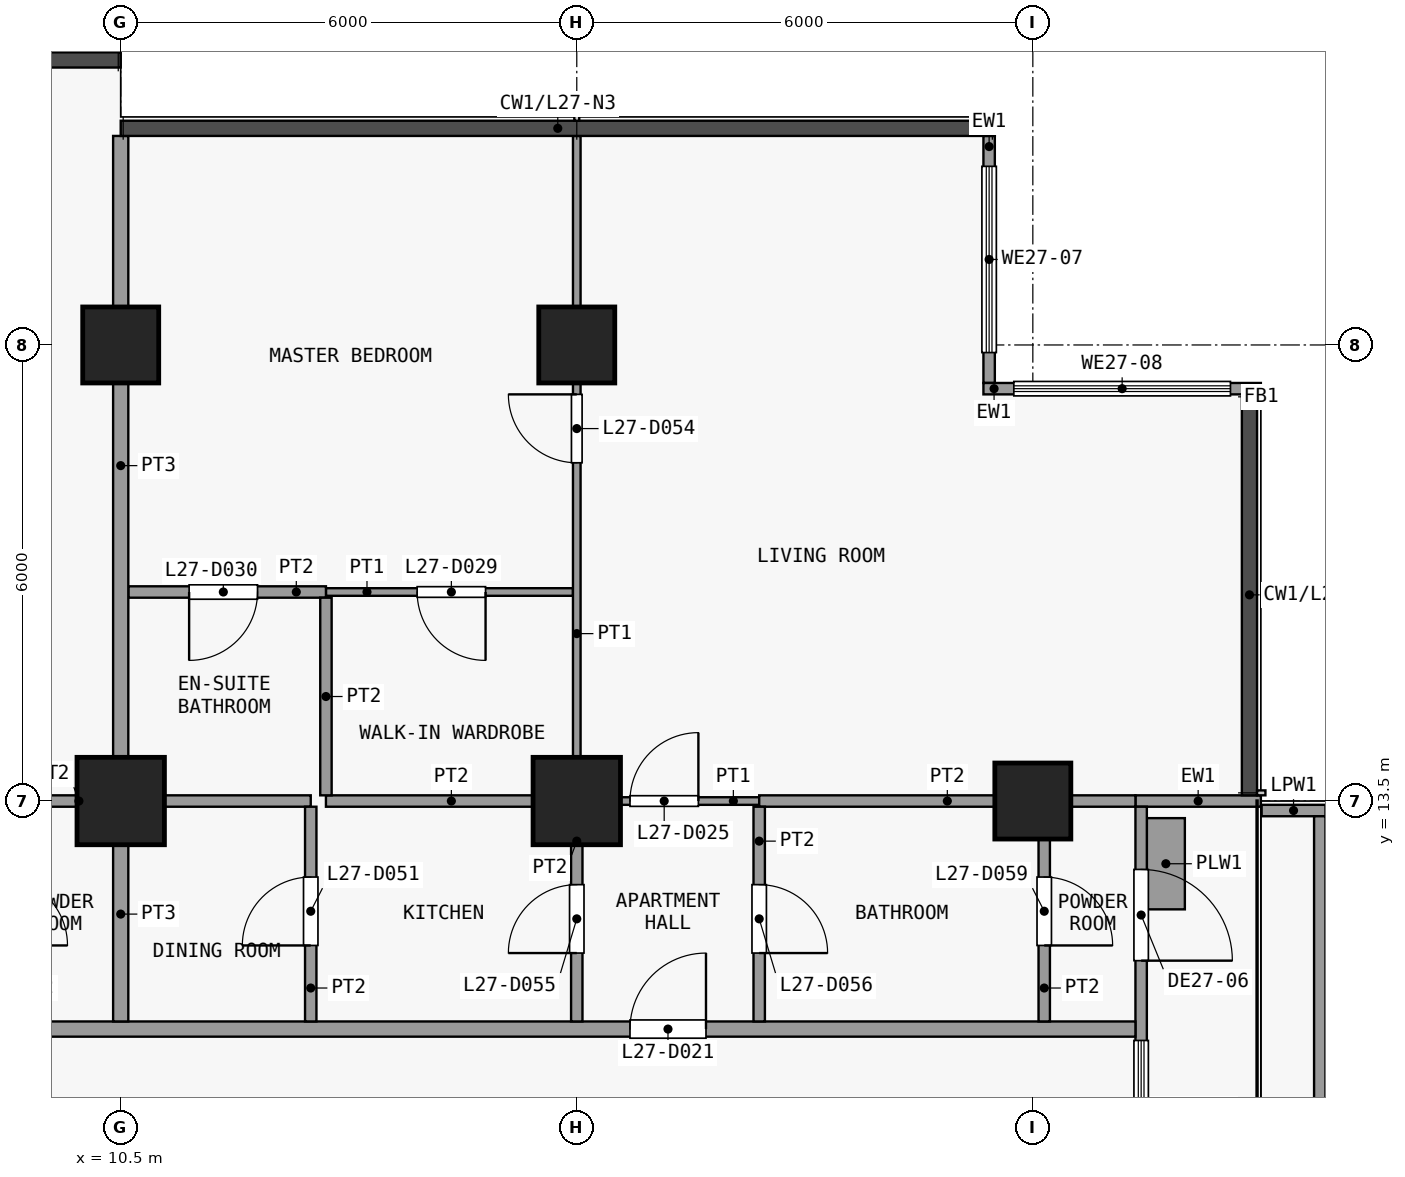
"""IFC4 building model, lengths in metres.
Left out: names, types, materials, properties, quantities, classifications, styles, units other than length and angle.
Written with IfcOpenShell. Run it as: python <this file> out.ifc"""

import sys

from ifc_helpers import new_model, si_unit, direction, frame, frame_2d, origin, origin_2d, place, context, subcontext, project, spatial, rectangle, extrude, element, fill, save


model = new_model("IFC4")
c1 = context("Model", 3, precision=1e-05, world=origin(), true_north=direction((0.0, 1.0)))
c2 = subcontext(c1, "Body", "Model", "MODEL_VIEW")
j1 = project(units=[si_unit("LENGTHUNIT", "METRE"), si_unit("PLANEANGLEUNIT", "RADIAN")], contexts=[c1])
p1 = place(None, origin())
s1 = spatial("IfcSite", under=j1, at=p1, CompositionType="ELEMENT")
p2 = place(p1, origin())
s2 = spatial("IfcBuilding", under=s1, at=p2, CompositionType="ELEMENT")
p3 = place(p2, frame((0.0, 0.0, 109.9)))
s3 = spatial("IfcBuildingStorey", under=s2, at=p3, CompositionType="ELEMENT", Elevation=109.9)
p4 = place(p3, frame((10.5, 13.5, 0.0), z_axis=(0.0, 0.0, 1.0), x_axis=(1.0, 0.0, 0.0)))
e1 = element("IfcColumn", 1, at=p4, inside=s3, PredefinedType="COLUMN", context=c2, shape_type="SweptSolid", body=[
    extrude(rectangle(XDim=1.15, YDim=1.15, at=origin_2d()), origin(), (0.0, 0.0, 1.0), 3.6),
])
p5 = place(p3, frame((10.5, 19.5, 0.0), z_axis=(0.0, 0.0, 1.0), x_axis=(1.0, 0.0, 0.0)))
e2 = element("IfcColumn", 2, at=p5, inside=s3, PredefinedType="COLUMN", context=c2, shape_type="SweptSolid", body=[
    extrude(rectangle(XDim=1.0, YDim=1.0, at=origin_2d()), origin(), (0.0, 0.0, 1.0), 3.6),
])
p6 = place(p3, frame((16.5, 13.5, 0.0), z_axis=(0.0, 0.0, 1.0), x_axis=(1.0, 0.0, 0.0)))
e3 = element("IfcColumn", 3, at=p6, inside=s3, PredefinedType="COLUMN", context=c2, shape_type="SweptSolid", body=[
    extrude(rectangle(XDim=1.15, YDim=1.15, at=origin_2d()), origin(), (0.0, 0.0, 1.0), 3.6),
])
for number, where, z_axis, x_axis in (
    (4, (16.5, 19.5, 0.0), (0.0, 0.0, 1.0), (1.0, 0.0, 0.0)),
    (5, (22.5, 13.5, 0.0), (0.0, 0.0, 1.0), (1.0, 0.0, 0.0)),
):
    element("IfcColumn", number, at=place(p3, frame(where, z_axis=z_axis, x_axis=x_axis)), inside=s3, PredefinedType="COLUMN", context=c2, shape_type="SweptSolid", body=[
        extrude(rectangle(XDim=1.0, YDim=1.0, at=origin_2d()), origin(), (0.0, 0.0, 1.0), 3.6),
    ])
p7 = place(p3, frame((21.925, 22.25, 0.0), z_axis=(0.0, 0.0, 1.0), x_axis=(0.0, -1.0, 0.0)))
e6 = element("IfcWall", 6, at=p7, inside=s3, PredefinedType="SOLIDWALL", context=c2, shape_type="SweptSolid", body=[
    extrude(rectangle(XDim=3.25, YDim=0.15, at=frame_2d((1.625, 0.0))), origin(), (0.0, 0.0, 1.0), 3.3),
])
p8 = place(p7, frame((0.4, 0.0, 0.9)))
e7 = element("IfcOpeningElement", 7, at=p8, cuts=e6, PredefinedType="OPENING", context=c2, shape_type="SweptSolid", body=[
    extrude(rectangle(XDim=2.45, YDim=2.4, at=frame_2d((1.225, 1.2))), frame((0.0, 0.085, 0.0), z_axis=(0.0, -1.0, 0.0), x_axis=(1.0, 0.0, 0.0)), (0.0, 0.0, 1.0), 0.17),
])
p9 = place(p3, frame((21.85, 18.925, 0.0), z_axis=(0.0, 0.0, 1.0), x_axis=(1.0, 0.0, 0.0)))
e8 = element("IfcWall", 8, at=p9, inside=s3, PredefinedType="SOLIDWALL", context=c2, shape_type="SweptSolid", body=[
    extrude(rectangle(XDim=3.65, YDim=0.15, at=frame_2d((1.825, 0.0))), origin(), (0.0, 0.0, 1.0), 3.3),
])
p10 = place(p9, frame((0.4, 0.0, 0.9)))
e9 = element("IfcOpeningElement", 9, at=p10, cuts=e8, PredefinedType="OPENING", context=c2, shape_type="SweptSolid", body=[
    extrude(rectangle(XDim=2.85, YDim=2.4, at=frame_2d((1.425, 1.2))), frame((0.0, 0.085, 0.0), z_axis=(0.0, -1.0, 0.0), x_axis=(1.0, 0.0, 0.0)), (0.0, 0.0, 1.0), 0.17),
])
p11 = place(p3, frame((23.85, 13.5, 0.0), z_axis=(0.0, 0.0, 1.0), x_axis=(1.0, 0.0, 0.0)))
e10 = element("IfcWall", 10, at=p11, inside=s3, PredefinedType="SOLIDWALL", context=c2, shape_type="SweptSolid", body=[
    extrude(rectangle(XDim=1.65, YDim=0.15, at=frame_2d((0.825, 0.0))), origin(), (0.0, 0.0, 1.0), 3.3),
])
p12 = place(p3, frame((23.925, 13.425, 0.0), z_axis=(0.0, 0.0, 1.0), x_axis=(0.0, -1.0, 0.0)))
e11 = element("IfcWall", 11, at=p12, inside=s3, PredefinedType="SOLIDWALL", context=c2, shape_type="SweptSolid", body=[
    extrude(rectangle(XDim=5.925, YDim=0.15, at=frame_2d((2.962, 0.0))), origin(), (0.0, 0.0, 1.0), 3.3),
])
p13 = place(p12, frame((0.825, 0.0, 0.0)))
e12 = element("IfcOpeningElement", 12, at=p13, cuts=e11, PredefinedType="OPENING", context=c2, shape_type="SweptSolid", body=[
    extrude(rectangle(XDim=1.2, YDim=2.4, at=frame_2d((0.6, 1.2))), frame((0.0, 0.085, 0.0), z_axis=(0.0, -1.0, 0.0), x_axis=(1.0, 0.0, 0.0)), (0.0, 0.0, 1.0), 0.17),
])
p14 = place(p12, frame((3.075, 0.0, 0.9)))
e13 = element("IfcOpeningElement", 13, at=p14, cuts=e11, PredefinedType="OPENING", context=c2, shape_type="SweptSolid", body=[
    extrude(rectangle(XDim=1.8, YDim=2.1, at=frame_2d((0.9, 1.05))), frame((0.0, 0.085, 0.0), z_axis=(0.0, -1.0, 0.0), x_axis=(1.0, 0.0, 0.0)), (0.0, 0.0, 1.0), 0.17),
])
p15 = place(p3, frame((24.25, 12.075, 0.0), z_axis=(0.0, 0.0, 1.0), x_axis=(0.0, 1.0, 0.0)))
e14 = element("IfcWall", 14, at=p15, inside=s3, PredefinedType="USERDEFINED", context=c2, shape_type="SweptSolid", body=[
    extrude(rectangle(XDim=1.2, YDim=0.5, at=frame_2d((0.6, 0.0))), origin(), (0.0, 0.0, 1.0), 0.9),
])
p16 = place(p3, frame((25.51, 13.375, 0.0), z_axis=(0.0, 0.0, 1.0), x_axis=(1.0, 0.0, 0.0)))
e15 = element("IfcWall", 15, at=p16, inside=s3, PredefinedType="PARAPET", context=c2, shape_type="SweptSolid", body=[
    extrude(rectangle(XDim=0.84, YDim=0.15, at=frame_2d((0.42, 0.0))), origin(), (0.0, 0.0, 1.0), 1.15),
])
p17 = place(p3, frame((26.275, 13.3, 0.0), z_axis=(0.0, 0.0, 1.0), x_axis=(0.0, -1.0, 0.0)))
e16 = element("IfcWall", 16, at=p17, inside=s3, PredefinedType="PARAPET", context=c2, shape_type="SweptSolid", body=[
    extrude(rectangle(XDim=11.8, YDim=0.15, at=frame_2d((5.9, 0.0))), origin(), (0.0, 0.0, 1.0), 1.15),
])
p18 = place(p3, frame((-23.85, 10.5, 0.0), z_axis=(0.0, 0.0, 1.0), x_axis=(1.0, 0.0, 0.0)))
e17 = element("IfcWall", 17, at=p18, inside=s3, PredefinedType="PARTITIONING", context=c2, shape_type="SweptSolid", body=[
    extrude(rectangle(XDim=47.7, YDim=0.2, at=frame_2d((23.85, 0.0))), origin(), (0.0, 0.0, 1.0), 3.3),
])
p19 = place(p18, frame((9.05, 0.0, 0.0)))
e18 = element("IfcOpeningElement", 18, at=p19, cuts=e17, PredefinedType="OPENING", context=c2, shape_type="SweptSolid", body=[
    extrude(rectangle(XDim=1.0, YDim=2.1, at=frame_2d((0.5, 1.05))), frame((0.0, 0.11, 0.0), z_axis=(0.0, -1.0, 0.0), x_axis=(1.0, 0.0, 0.0)), (0.0, 0.0, 1.0), 0.22),
])
p20 = place(p18, frame((14.05, 0.0, 0.0)))
e19 = element("IfcOpeningElement", 19, at=p20, cuts=e17, PredefinedType="OPENING", context=c2, shape_type="SweptSolid", body=[
    extrude(rectangle(XDim=1.0, YDim=2.1, at=frame_2d((0.5, 1.05))), frame((0.0, 0.11, 0.0), z_axis=(0.0, -1.0, 0.0), x_axis=(1.0, 0.0, 0.0)), (0.0, 0.0, 1.0), 0.22),
])
p21 = place(p18, frame((29.05, 0.0, 0.0)))
e20 = element("IfcOpeningElement", 20, at=p21, cuts=e17, PredefinedType="OPENING", context=c2, shape_type="SweptSolid", body=[
    extrude(rectangle(XDim=1.0, YDim=2.1, at=frame_2d((0.5, 1.05))), frame((0.0, 0.11, 0.0), z_axis=(0.0, -1.0, 0.0), x_axis=(1.0, 0.0, 0.0)), (0.0, 0.0, 1.0), 0.22),
])
p22 = place(p18, frame((41.05, 0.0, 0.0)))
e21 = element("IfcOpeningElement", 21, at=p22, cuts=e17, PredefinedType="OPENING", context=c2, shape_type="SweptSolid", body=[
    extrude(rectangle(XDim=1.0, YDim=2.1, at=frame_2d((0.5, 1.05))), frame((0.0, 0.11, 0.0), z_axis=(0.0, -1.0, 0.0), x_axis=(1.0, 0.0, 0.0)), (0.0, 0.0, 1.0), 0.22),
])
p23 = place(p3, frame((16.5, 13.5, 0.0), z_axis=(0.0, 0.0, 1.0), x_axis=(1.0, 0.0, 0.0)))
e22 = element("IfcWall", 22, at=p23, inside=s3, PredefinedType="PARTITIONING", context=c2, shape_type="SweptSolid", body=[
    extrude(rectangle(XDim=2.4, YDim=0.1, at=frame_2d((1.2, 0.0))), origin(), (0.0, 0.0, 1.0), 3.3),
])
p24 = place(p23, frame((0.7, 0.0, 0.0)))
e23 = element("IfcOpeningElement", 23, at=p24, cuts=e22, PredefinedType="OPENING", context=c2, shape_type="SweptSolid", body=[
    extrude(rectangle(XDim=0.9, YDim=2.1, at=frame_2d((0.45, 1.05))), frame((0.0, 0.06, 0.0), z_axis=(0.0, -1.0, 0.0), x_axis=(1.0, 0.0, 0.0)), (0.0, 0.0, 1.0), 0.12),
])
p25 = place(p3, frame((6.9, 13.5, 0.0), z_axis=(0.0, 0.0, 1.0), x_axis=(1.0, 0.0, 0.0)))
e24 = element("IfcWall", 24, at=p25, inside=s3, PredefinedType="PARTITIONING", context=c2, shape_type="SweptSolid", body=[
    extrude(rectangle(XDim=6.1, YDim=0.15, at=frame_2d((3.05, 0.0))), origin(), (0.0, 0.0, 1.0), 3.3),
])
p26 = place(p3, frame((13.2, 13.5, 0.0), z_axis=(0.0, 0.0, 1.0), x_axis=(1.0, 0.0, 0.0)))
e25 = element("IfcWall", 25, at=p26, inside=s3, PredefinedType="PARTITIONING", context=c2, shape_type="SweptSolid", body=[
    extrude(rectangle(XDim=3.3, YDim=0.15, at=frame_2d((1.65, 0.0))), origin(), (0.0, 0.0, 1.0), 3.3),
])
p27 = place(p3, frame((18.9, 13.5, 0.0), z_axis=(0.0, 0.0, 1.0), x_axis=(1.0, 0.0, 0.0)))
e26 = element("IfcWall", 26, at=p27, inside=s3, PredefinedType="PARTITIONING", context=c2, shape_type="SweptSolid", body=[
    extrude(rectangle(XDim=4.95, YDim=0.15, at=frame_2d((2.475, 0.0))), origin(), (0.0, 0.0, 1.0), 3.3),
])
p28 = place(p3, frame((13.2, 16.25, 0.0), z_axis=(0.0, 0.0, 1.0), x_axis=(1.0, 0.0, 0.0)))
e27 = element("IfcWall", 27, at=p28, inside=s3, PredefinedType="PARTITIONING", context=c2, shape_type="SweptSolid", body=[
    extrude(rectangle(XDim=3.25, YDim=0.1, at=frame_2d((1.625, 0.0))), origin(), (0.0, 0.0, 1.0), 3.3),
])
p29 = place(p28, frame((1.2, 0.0, 0.0)))
e28 = element("IfcOpeningElement", 28, at=p29, cuts=e27, PredefinedType="OPENING", context=c2, shape_type="SweptSolid", body=[
    extrude(rectangle(XDim=0.9, YDim=2.1, at=frame_2d((0.45, 1.05))), frame((0.0, 0.06, 0.0), z_axis=(0.0, -1.0, 0.0), x_axis=(1.0, 0.0, 0.0)), (0.0, 0.0, 1.0), 0.12),
])
p30 = place(p3, frame((10.6, 16.25, 0.0), z_axis=(0.0, 0.0, 1.0), x_axis=(1.0, 0.0, 0.0)))
e29 = element("IfcWall", 29, at=p30, inside=s3, PredefinedType="PARTITIONING", context=c2, shape_type="SweptSolid", body=[
    extrude(rectangle(XDim=2.6, YDim=0.15, at=frame_2d((1.3, 0.0))), origin(), (0.0, 0.0, 1.0), 3.3),
])
p31 = place(p30, frame((0.8, 0.0, 0.0)))
e30 = element("IfcOpeningElement", 30, at=p31, cuts=e29, PredefinedType="OPENING", context=c2, shape_type="SweptSolid", body=[
    extrude(rectangle(XDim=0.9, YDim=2.1, at=frame_2d((0.45, 1.05))), frame((0.0, 0.085, 0.0), z_axis=(0.0, -1.0, 0.0), x_axis=(1.0, 0.0, 0.0)), (0.0, 0.0, 1.0), 0.17),
])
p32 = place(p3, frame((10.5, 10.6, 0.0), z_axis=(0.0, 0.0, 1.0), x_axis=(0.0, 1.0, 0.0)))
e31 = element("IfcWall", 31, at=p32, inside=s3, PredefinedType="PARTITIONING", context=c2, shape_type="SweptSolid", body=[
    extrude(rectangle(XDim=2.825, YDim=0.2, at=frame_2d((1.413, 0.0))), origin(), (0.0, 0.0, 1.0), 3.3),
])
p33 = place(p3, frame((10.5, 13.575, 0.0), z_axis=(0.0, 0.0, 1.0), x_axis=(0.0, 1.0, 0.0)))
e32 = element("IfcWall", 32, at=p33, inside=s3, PredefinedType="PARTITIONING", context=c2, shape_type="SweptSolid", body=[
    extrude(rectangle(XDim=8.675, YDim=0.2, at=frame_2d((4.337, 0.0))), origin(), (0.0, 0.0, 1.0), 3.3),
])
p34 = place(p3, frame((13.0, 10.6, 0.0), z_axis=(0.0, 0.0, 1.0), x_axis=(0.0, 1.0, 0.0)))
e33 = element("IfcWall", 33, at=p34, inside=s3, PredefinedType="PARTITIONING", context=c2, shape_type="SweptSolid", body=[
    extrude(rectangle(XDim=2.825, YDim=0.15, at=frame_2d((1.413, 0.0))), origin(), (0.0, 0.0, 1.0), 3.3),
])
p35 = place(p34, frame((1.0, 0.0, 0.0)))
e34 = element("IfcOpeningElement", 34, at=p35, cuts=e33, PredefinedType="OPENING", context=c2, shape_type="SweptSolid", body=[
    extrude(rectangle(XDim=0.9, YDim=2.1, at=frame_2d((0.45, 1.05))), frame((0.0, 0.085, 0.0), z_axis=(0.0, -1.0, 0.0), x_axis=(1.0, 0.0, 0.0)), (0.0, 0.0, 1.0), 0.17),
])
p36 = place(p3, frame((13.2, 13.575, 0.0), z_axis=(0.0, 0.0, 1.0), x_axis=(0.0, 1.0, 0.0)))
e35 = element("IfcWall", 35, at=p36, inside=s3, PredefinedType="PARTITIONING", context=c2, shape_type="SweptSolid", body=[
    extrude(rectangle(XDim=2.6, YDim=0.15, at=frame_2d((1.3, 0.0))), origin(), (0.0, 0.0, 1.0), 3.3),
])
p37 = place(p3, frame((16.5, 13.575, 0.0), z_axis=(0.0, 0.0, 1.0), x_axis=(0.0, 1.0, 0.0)))
e36 = element("IfcWall", 36, at=p37, inside=s3, PredefinedType="PARTITIONING", context=c2, shape_type="SweptSolid", body=[
    extrude(rectangle(XDim=8.675, YDim=0.1, at=frame_2d((4.337, 0.0))), origin(), (0.0, 0.0, 1.0), 3.3),
])
p38 = place(p37, frame((4.375, 0.0, 0.0)))
e37 = element("IfcOpeningElement", 37, at=p38, cuts=e36, PredefinedType="OPENING", context=c2, shape_type="SweptSolid", body=[
    extrude(rectangle(XDim=0.9, YDim=2.1, at=frame_2d((0.45, 1.05))), frame((0.0, 0.06, 0.0), z_axis=(0.0, -1.0, 0.0), x_axis=(1.0, 0.0, 0.0)), (0.0, 0.0, 1.0), 0.12),
])
p39 = place(p3, frame((16.5, 10.6, 0.0), z_axis=(0.0, 0.0, 1.0), x_axis=(0.0, 1.0, 0.0)))
e38 = element("IfcWall", 38, at=p39, inside=s3, PredefinedType="PARTITIONING", context=c2, shape_type="SweptSolid", body=[
    extrude(rectangle(XDim=2.825, YDim=0.15, at=frame_2d((1.413, 0.0))), origin(), (0.0, 0.0, 1.0), 3.3),
])
p40 = place(p39, frame((0.9, 0.0, 0.0)))
e39 = element("IfcOpeningElement", 39, at=p40, cuts=e38, PredefinedType="OPENING", context=c2, shape_type="SweptSolid", body=[
    extrude(rectangle(XDim=0.9, YDim=2.1, at=frame_2d((0.45, 1.05))), frame((0.0, 0.085, 0.0), z_axis=(0.0, -1.0, 0.0), x_axis=(1.0, 0.0, 0.0)), (0.0, 0.0, 1.0), 0.17),
])
p41 = place(p3, frame((18.9, 10.6, 0.0), z_axis=(0.0, 0.0, 1.0), x_axis=(0.0, 1.0, 0.0)))
e40 = element("IfcWall", 40, at=p41, inside=s3, PredefinedType="PARTITIONING", context=c2, shape_type="SweptSolid", body=[
    extrude(rectangle(XDim=2.825, YDim=0.15, at=frame_2d((1.413, 0.0))), origin(), (0.0, 0.0, 1.0), 3.3),
])
p42 = place(p41, frame((0.9, 0.0, 0.0)))
e41 = element("IfcOpeningElement", 41, at=p42, cuts=e40, PredefinedType="OPENING", context=c2, shape_type="SweptSolid", body=[
    extrude(rectangle(XDim=0.9, YDim=2.1, at=frame_2d((0.45, 1.05))), frame((0.0, 0.085, 0.0), z_axis=(0.0, -1.0, 0.0), x_axis=(1.0, 0.0, 0.0)), (0.0, 0.0, 1.0), 0.17),
])
p43 = place(p3, frame((22.65, 10.6, 0.0), z_axis=(0.0, 0.0, 1.0), x_axis=(0.0, 1.0, 0.0)))
e42 = element("IfcWall", 42, at=p43, inside=s3, PredefinedType="PARTITIONING", context=c2, shape_type="SweptSolid", body=[
    extrude(rectangle(XDim=2.825, YDim=0.15, at=frame_2d((1.413, 0.0))), origin(), (0.0, 0.0, 1.0), 3.3),
])
p44 = place(p43, frame((1.0, 0.0, 0.0)))
e43 = element("IfcOpeningElement", 43, at=p44, cuts=e42, PredefinedType="OPENING", context=c2, shape_type="SweptSolid", body=[
    extrude(rectangle(XDim=0.9, YDim=2.1, at=frame_2d((0.45, 1.05))), frame((0.0, 0.085, 0.0), z_axis=(0.0, -1.0, 0.0), x_axis=(1.0, 0.0, 0.0)), (0.0, 0.0, 1.0), 0.17),
])
p45 = place(p8, origin())
e44 = element("IfcWindow", 44, at=p45, inside=s3, PartitioningType="SINGLE_PANEL", PredefinedType="WINDOW", context=c2, shape_type="SweptSolid", body=[
    extrude(rectangle(XDim=2.45, YDim=2.4, at=frame_2d((1.225, 1.2))), frame((0.0, 0.03, 0.0), z_axis=(0.0, -1.0, 0.0), x_axis=(1.0, 0.0, 0.0)), (0.0, 0.0, 1.0), 0.06),
])
fill(e7, e44)
p46 = place(p10, origin())
e45 = element("IfcWindow", 45, at=p46, inside=s3, PartitioningType="SINGLE_PANEL", PredefinedType="WINDOW", context=c2, shape_type="SweptSolid", body=[
    extrude(rectangle(XDim=2.85, YDim=2.4, at=frame_2d((1.425, 1.2))), frame((0.0, 0.03, 0.0), z_axis=(0.0, -1.0, 0.0), x_axis=(1.0, 0.0, 0.0)), (0.0, 0.0, 1.0), 0.06),
])
fill(e9, e45)
p47 = place(p13, origin())
e46 = element("IfcDoor", 46, at=p47, inside=s3, OperationType="SINGLE_SWING_RIGHT", PredefinedType="DOOR", context=c2, shape_type="SweptSolid", body=[
    extrude(rectangle(XDim=1.2, YDim=2.4, at=frame_2d((0.6, 1.2))), frame((0.0, 0.025, 0.0), z_axis=(0.0, -1.0, 0.0), x_axis=(1.0, 0.0, 0.0)), (0.0, 0.0, 1.0), 0.05),
])
fill(e12, e46)
p48 = place(p14, origin())
e47 = element("IfcWindow", 47, at=p48, inside=s3, PartitioningType="SINGLE_PANEL", PredefinedType="WINDOW", context=c2, shape_type="SweptSolid", body=[
    extrude(rectangle(XDim=1.8, YDim=2.1, at=frame_2d((0.9, 1.05))), frame((0.0, 0.03, 0.0), z_axis=(0.0, -1.0, 0.0), x_axis=(1.0, 0.0, 0.0)), (0.0, 0.0, 1.0), 0.06),
])
fill(e13, e47)
p49 = place(p22, origin())
e48 = element("IfcDoor", 48, at=p49, inside=s3, OperationType="SINGLE_SWING_LEFT", PredefinedType="DOOR", context=c2, shape_type="SweptSolid", body=[
    extrude(rectangle(XDim=1.0, YDim=2.1, at=frame_2d((0.5, 1.05))), frame((0.0, 0.025, 0.0), z_axis=(0.0, -1.0, 0.0), x_axis=(1.0, 0.0, 0.0)), (0.0, 0.0, 1.0), 0.05),
])
fill(e21, e48)
p50 = place(p24, origin())
e49 = element("IfcDoor", 49, at=p50, inside=s3, OperationType="SINGLE_SWING_LEFT", PredefinedType="DOOR", context=c2, shape_type="SweptSolid", body=[
    extrude(rectangle(XDim=0.9, YDim=2.1, at=frame_2d((0.45, 1.05))), frame((0.0, 0.025, 0.0), z_axis=(0.0, -1.0, 0.0), x_axis=(1.0, 0.0, 0.0)), (0.0, 0.0, 1.0), 0.05),
])
fill(e23, e49)
p51 = place(p29, origin())
e50 = element("IfcDoor", 50, at=p51, inside=s3, OperationType="SINGLE_SWING_RIGHT", PredefinedType="DOOR", context=c2, shape_type="SweptSolid", body=[
    extrude(rectangle(XDim=0.9, YDim=2.1, at=frame_2d((0.45, 1.05))), frame((0.0, 0.025, 0.0), z_axis=(0.0, -1.0, 0.0), x_axis=(1.0, 0.0, 0.0)), (0.0, 0.0, 1.0), 0.05),
])
fill(e28, e50)
p52 = place(p31, origin())
e51 = element("IfcDoor", 51, at=p52, inside=s3, OperationType="SINGLE_SWING_LEFT", PredefinedType="DOOR", context=c2, shape_type="SweptSolid", body=[
    extrude(rectangle(XDim=0.9, YDim=2.1, at=frame_2d((0.45, 1.05))), frame((0.0, 0.025, 0.0), z_axis=(0.0, -1.0, 0.0), x_axis=(1.0, 0.0, 0.0)), (0.0, 0.0, 1.0), 0.05),
])
fill(e30, e51)
p53 = place(p35, origin())
e52 = element("IfcDoor", 52, at=p53, inside=s3, OperationType="SINGLE_SWING_RIGHT", PredefinedType="DOOR", context=c2, shape_type="SweptSolid", body=[
    extrude(rectangle(XDim=0.9, YDim=2.1, at=frame_2d((0.45, 1.05))), frame((0.0, 0.025, 0.0), z_axis=(0.0, -1.0, 0.0), x_axis=(1.0, 0.0, 0.0)), (0.0, 0.0, 1.0), 0.05),
])
fill(e34, e52)
p54 = place(p38, origin())
e53 = element("IfcDoor", 53, at=p54, inside=s3, OperationType="SINGLE_SWING_LEFT", PredefinedType="DOOR", context=c2, shape_type="SweptSolid", body=[
    extrude(rectangle(XDim=0.9, YDim=2.1, at=frame_2d((0.45, 1.05))), frame((0.0, 0.025, 0.0), z_axis=(0.0, -1.0, 0.0), x_axis=(1.0, 0.0, 0.0)), (0.0, 0.0, 1.0), 0.05),
])
fill(e37, e53)
p55 = place(p40, origin())
e54 = element("IfcDoor", 54, at=p55, inside=s3, OperationType="SINGLE_SWING_RIGHT", PredefinedType="DOOR", context=c2, shape_type="SweptSolid", body=[
    extrude(rectangle(XDim=0.9, YDim=2.1, at=frame_2d((0.45, 1.05))), frame((0.0, 0.025, 0.0), z_axis=(0.0, -1.0, 0.0), x_axis=(1.0, 0.0, 0.0)), (0.0, 0.0, 1.0), 0.05),
])
fill(e39, e54)
p56 = place(p42, origin())
e55 = element("IfcDoor", 55, at=p56, inside=s3, OperationType="SINGLE_SWING_LEFT", PredefinedType="DOOR", context=c2, shape_type="SweptSolid", body=[
    extrude(rectangle(XDim=0.9, YDim=2.1, at=frame_2d((0.45, 1.05))), frame((0.0, 0.025, 0.0), z_axis=(0.0, -1.0, 0.0), x_axis=(1.0, 0.0, 0.0)), (0.0, 0.0, 1.0), 0.05),
])
fill(e41, e55)
p57 = place(p44, origin())
e56 = element("IfcDoor", 56, at=p57, inside=s3, OperationType="SINGLE_SWING_LEFT", PredefinedType="DOOR", context=c2, shape_type="SweptSolid", body=[
    extrude(rectangle(XDim=0.9, YDim=2.1, at=frame_2d((0.45, 1.05))), frame((0.0, 0.025, 0.0), z_axis=(0.0, -1.0, 0.0), x_axis=(1.0, 0.0, 0.0)), (0.0, 0.0, 1.0), 0.05),
])
fill(e43, e56)
save(model, sys.argv[1])
